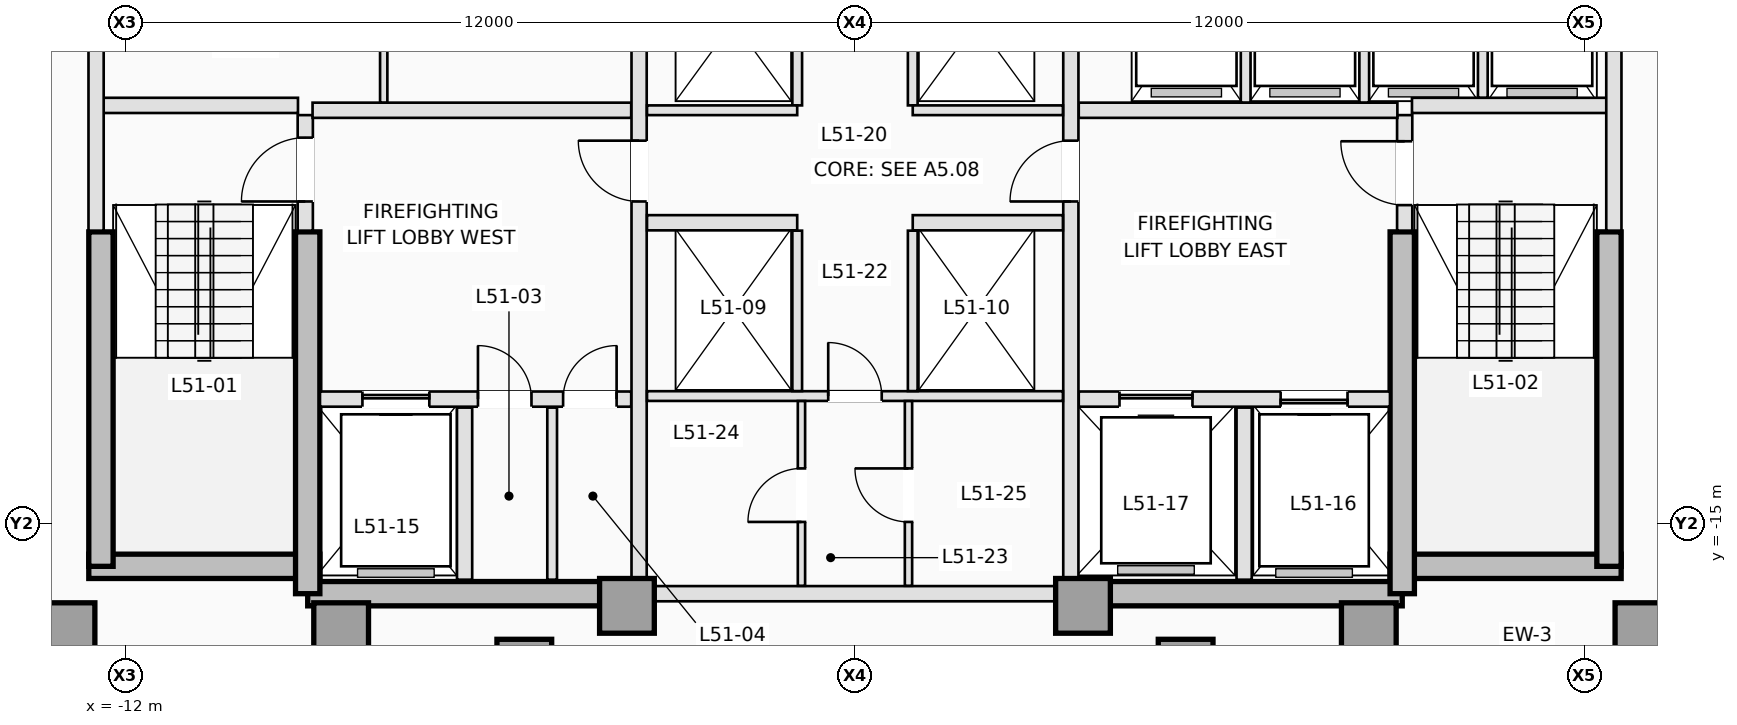
"""IFC4 building model, lengths in metres.
Left out: names, types, materials, properties, quantities, classifications, styles, units other than length and angle.
Written with IfcOpenShell. Run it as: python <this file> out.ifc"""

import sys

from ifc_helpers import new_model, si_unit, direction, frame, frame_2d, origin, origin_2d, place, context, subcontext, project, spatial, rectangle, extrude, element, fill, save


model = new_model("IFC4")
c1 = context("Model", 3, precision=1e-05, world=origin(), true_north=direction((0.0, 1.0)))
c2 = subcontext(c1, "Body", "Model", "MODEL_VIEW")
j1 = project(units=[si_unit("LENGTHUNIT", "METRE"), si_unit("PLANEANGLEUNIT", "RADIAN")], contexts=[c1])
p1 = place(None, origin())
s1 = spatial("IfcSite", under=j1, at=p1, CompositionType="ELEMENT")
p2 = place(p1, origin())
s2 = spatial("IfcBuilding", under=s1, at=p2, CompositionType="ELEMENT")
p3 = place(p2, frame((0.0, 0.0, 186.9)))
s3 = spatial("IfcBuildingStorey", under=s2, at=p3, CompositionType="ELEMENT", Elevation=186.9)
p4 = place(p3, frame((-12.6, -15.7, 0.0), z_axis=(0.0, 0.0, 1.0), x_axis=(1.0, 0.0, 0.0)))
e1 = element("IfcWall", 1, at=p4, inside=s3, PredefinedType="SHEAR", context=c2, shape_type="SweptSolid", body=[
    extrude(rectangle(XDim=3.8, YDim=0.4, at=frame_2d((1.9, 0.0))), origin(), (0.0, 0.0, 1.0), 3.5),
])
for number, where, z_axis, x_axis in (
    (2, (-9.0, -16.15, 0.0), (0.0, 0.0, 1.0), (1.0, 0.0, 0.0)),
    (3, (3.75, -16.15, 0.0), (0.0, 0.0, 1.0), (1.0, 0.0, 0.0)),
):
    element("IfcWall", number, at=place(p3, frame(where, z_axis=z_axis, x_axis=x_axis)), inside=s3, PredefinedType="SHEAR", context=c2, shape_type="SweptSolid", body=[
        extrude(rectangle(XDim=5.25, YDim=0.4, at=frame_2d((2.625, 0.0))), origin(), (0.0, 0.0, 1.0), 3.5),
    ])
p5 = place(p3, frame((8.8, -15.7, 0.0), z_axis=(0.0, 0.0, 1.0), x_axis=(1.0, 0.0, 0.0)))
e4 = element("IfcWall", 4, at=p5, inside=s3, PredefinedType="SHEAR", context=c2, shape_type="SweptSolid", body=[
    extrude(rectangle(XDim=3.8, YDim=0.4, at=frame_2d((1.9, 0.0))), origin(), (0.0, 0.0, 1.0), 3.5),
])
for number, where, z_axis, x_axis in (
    (5, (-12.4, -15.7, 0.0), (0.0, 0.0, 1.0), (0.0, 1.0, 0.0)),
    (6, (12.4, -15.7, 0.0), (0.0, 0.0, 1.0), (0.0, 1.0, 0.0)),
):
    element("IfcWall", number, at=place(p3, frame(where, z_axis=z_axis, x_axis=x_axis)), inside=s3, PredefinedType="SHEAR", context=c2, shape_type="SweptSolid", body=[
        extrude(rectangle(XDim=5.5, YDim=0.4, at=frame_2d((2.75, 0.0))), origin(), (0.0, 0.0, 1.0), 3.5),
    ])
for number, where, z_axis, x_axis in (
    (7, (-9.0, -16.15, 0.0), (0.0, 0.0, 1.0), (0.0, 1.0, 0.0)),
    (8, (9.0, -16.15, 0.0), (0.0, 0.0, 1.0), (0.0, 1.0, 0.0)),
):
    element("IfcWall", number, at=place(p3, frame(where, z_axis=z_axis, x_axis=x_axis)), inside=s3, PredefinedType="SHEAR", context=c2, shape_type="SweptSolid", body=[
        extrude(rectangle(XDim=5.95, YDim=0.4, at=frame_2d((2.975, 0.0))), origin(), (0.0, 0.0, 1.0), 3.5),
    ])
for number, where, z_axis, x_axis in (
    (9, (-12.95, -16.75, 0.0), (0.0, 0.0, 1.0), (1.0, 0.0, 0.0)),
    (10, (-8.45, -16.75, 0.0), (0.0, 0.0, 1.0), (1.0, 0.0, 0.0)),
    (11, (-3.75, -16.35, 0.0), (0.0, 0.0, 1.0), (1.0, 0.0, 0.0)),
    (12, (3.75, -16.35, 0.0), (0.0, 0.0, 1.0), (1.0, 0.0, 0.0)),
    (13, (8.45, -16.75, 0.0), (0.0, 0.0, 1.0), (1.0, 0.0, 0.0)),
    (14, (12.95, -16.75, 0.0), (0.0, 0.0, 1.0), (1.0, 0.0, 0.0)),
    (15, (-5.438, -17.35, 0.0), (0.0, 0.0, 1.0), (0.0, 1.0, 0.0)),
    (16, (5.438, -17.35, 0.0), (0.0, 0.0, 1.0), (0.0, 1.0, 0.0)),
):
    element("IfcColumn", number, at=place(p3, frame(where, z_axis=z_axis, x_axis=x_axis)), inside=s3, PredefinedType="COLUMN", context=c2, shape_type="SweptSolid", body=[
        extrude(rectangle(XDim=0.9, YDim=0.9, at=origin_2d()), origin(), (0.0, 0.0, 1.0), 3.5),
    ])
p6 = place(p3, frame((-9.04, -10.18, 0.0), z_axis=(0.0, 0.0, 1.0), x_axis=(0.0, 1.0, 0.0)))
e17 = element("IfcWall", 17, at=p6, inside=s3, PredefinedType="PARTITIONING", context=c2, shape_type="SweptSolid", body=[
    extrude(rectangle(XDim=1.9, YDim=0.25, at=frame_2d((0.95, 0.0))), origin(), (0.0, 0.0, 1.0), 3.25),
])
p7 = place(p6, frame((0.48, 0.0, 0.0)))
e18 = element("IfcOpeningElement", 18, at=p7, cuts=e17, PredefinedType="OPENING", context=c2, shape_type="SweptSolid", body=[
    extrude(rectangle(XDim=1.05, YDim=2.15, at=frame_2d((0.525, 1.075))), frame((0.0, 0.135, 0.0), z_axis=(0.0, -1.0, 0.0), x_axis=(1.0, 0.0, 0.0)), (0.0, 0.0, 1.0), 0.27),
])
p8 = place(p3, frame((9.04, -10.18, 0.0), z_axis=(0.0, 0.0, 1.0), x_axis=(0.0, 1.0, 0.0)))
e19 = element("IfcWall", 19, at=p8, inside=s3, PredefinedType="PARTITIONING", context=c2, shape_type="SweptSolid", body=[
    extrude(rectangle(XDim=1.9, YDim=0.25, at=frame_2d((0.95, 0.0))), origin(), (0.0, 0.0, 1.0), 3.25),
])
p9 = place(p8, frame((0.42, 0.0, 0.0)))
e20 = element("IfcOpeningElement", 20, at=p9, cuts=e19, PredefinedType="OPENING", context=c2, shape_type="SweptSolid", body=[
    extrude(rectangle(XDim=1.05, YDim=2.15, at=frame_2d((0.525, 1.075))), frame((0.0, 0.135, 0.0), z_axis=(0.0, -1.0, 0.0), x_axis=(1.0, 0.0, 0.0)), (0.0, 0.0, 1.0), 0.27),
])
for number, where, z_axis, x_axis in (
    (21, (-12.38, -8.12, 0.0), (0.0, 0.0, 1.0), (1.0, 0.0, 0.0)),
    (22, (9.16, -8.12, 0.0), (0.0, 0.0, 1.0), (1.0, 0.0, 0.0)),
):
    element("IfcWall", number, at=place(p3, frame(where, z_axis=z_axis, x_axis=x_axis)), inside=s3, PredefinedType="PARTITIONING", context=c2, shape_type="SweptSolid", body=[
        extrude(rectangle(XDim=3.22, YDim=0.25, at=frame_2d((1.61, 0.0))), origin(), (0.0, 0.0, 1.0), 3.25),
    ])
for number, where, z_axis, x_axis in (
    (23, (-12.48, -10.18, 0.0), (0.0, 0.0, 1.0), (0.0, 1.0, 0.0)),
    (24, (12.48, -10.18, 0.0), (0.0, 0.0, 1.0), (0.0, 1.0, 0.0)),
):
    element("IfcWall", number, at=place(p3, frame(where, z_axis=z_axis, x_axis=x_axis)), inside=s3, PredefinedType="PARTITIONING", context=c2, shape_type="SweptSolid", body=[
        extrude(rectangle(XDim=4.84, YDim=0.25, at=frame_2d((2.42, 0.0))), origin(), (0.0, 0.0, 1.0), 3.25),
    ])
p10 = place(p3, frame((-8.798, -12.95, 0.0), z_axis=(0.0, 0.0, 1.0), x_axis=(1.0, 0.0, 0.0)))
e25 = element("IfcWall", 25, at=p10, inside=s3, PredefinedType="PARTITIONING", context=c2, shape_type="SweptSolid", body=[
    extrude(rectangle(XDim=5.118, YDim=0.25, at=frame_2d((2.559, 0.0))), origin(), (0.0, 0.0, 1.0), 3.25),
])
p11 = place(p10, frame((0.698, 0.0, 0.0)))
e26 = element("IfcOpeningElement", 26, at=p11, cuts=e25, PredefinedType="OPENING", context=c2, shape_type="SweptSolid", body=[
    extrude(rectangle(XDim=1.1, YDim=2.15, at=frame_2d((0.55, 1.075))), frame((0.0, 0.135, 0.0), z_axis=(0.0, -1.0, 0.0), x_axis=(1.0, 0.0, 0.0)), (0.0, 0.0, 1.0), 0.27),
])
p12 = place(p10, frame((2.598, 0.0, 0.0)))
e27 = element("IfcOpeningElement", 27, at=p12, cuts=e25, PredefinedType="OPENING", context=c2, shape_type="SweptSolid", body=[
    extrude(rectangle(XDim=0.88, YDim=2.1, at=frame_2d((0.44, 1.05))), frame((0.0, 0.135, 0.0), z_axis=(0.0, -1.0, 0.0), x_axis=(1.0, 0.0, 0.0)), (0.0, 0.0, 1.0), 0.27),
])
p13 = place(p10, frame((3.998, 0.0, 0.0)))
e28 = element("IfcOpeningElement", 28, at=p13, cuts=e25, PredefinedType="OPENING", context=c2, shape_type="SweptSolid", body=[
    extrude(rectangle(XDim=0.88, YDim=2.1, at=frame_2d((0.44, 1.05))), frame((0.0, 0.135, 0.0), z_axis=(0.0, -1.0, 0.0), x_axis=(1.0, 0.0, 0.0)), (0.0, 0.0, 1.0), 0.27),
])
p14 = place(p3, frame((3.68, -12.95, 0.0), z_axis=(0.0, 0.0, 1.0), x_axis=(1.0, 0.0, 0.0)))
e29 = element("IfcWall", 29, at=p14, inside=s3, PredefinedType="PARTITIONING", context=c2, shape_type="SweptSolid", body=[
    extrude(rectangle(XDim=5.118, YDim=0.25, at=frame_2d((2.559, 0.0))), origin(), (0.0, 0.0, 1.0), 3.25),
])
p15 = place(p14, frame((3.32, 0.0, 0.0)))
e30 = element("IfcOpeningElement", 30, at=p15, cuts=e29, PredefinedType="OPENING", context=c2, shape_type="SweptSolid", body=[
    extrude(rectangle(XDim=1.1, YDim=2.15, at=frame_2d((0.55, 1.075))), frame((0.0, 0.135, 0.0), z_axis=(0.0, -1.0, 0.0), x_axis=(1.0, 0.0, 0.0)), (0.0, 0.0, 1.0), 0.27),
])
p16 = place(p14, frame((0.67, 0.0, 0.0)))
e31 = element("IfcOpeningElement", 31, at=p16, cuts=e29, PredefinedType="OPENING", context=c2, shape_type="SweptSolid", body=[
    extrude(rectangle(XDim=1.2, YDim=2.15, at=frame_2d((0.6, 1.075))), frame((0.0, 0.135, 0.0), z_axis=(0.0, -1.0, 0.0), x_axis=(1.0, 0.0, 0.0)), (0.0, 0.0, 1.0), 0.27),
])
p17 = place(p3, frame((-6.42, -15.92, 0.0), z_axis=(0.0, 0.0, 1.0), x_axis=(0.0, 1.0, 0.0)))
e32 = element("IfcWall", 32, at=p17, inside=s3, PredefinedType="PARTITIONING", context=c2, shape_type="SweptSolid", body=[
    extrude(rectangle(XDim=2.83, YDim=0.25, at=frame_2d((1.415, 0.0))), origin(), (0.0, 0.0, 1.0), 3.25),
])
p18 = place(p3, frame((-4.98, -15.92, 0.0), z_axis=(0.0, 0.0, 1.0), x_axis=(0.0, 1.0, 0.0)))
e33 = element("IfcWall", 33, at=p18, inside=s3, PredefinedType="PARTITIONING", context=c2, shape_type="SweptSolid", body=[
    extrude(rectangle(XDim=2.83, YDim=0.16, at=frame_2d((1.415, 0.0))), origin(), (0.0, 0.0, 1.0), 3.25),
])
p19 = place(p3, frame((6.4, -15.92, 0.0), z_axis=(0.0, 0.0, 1.0), x_axis=(0.0, 1.0, 0.0)))
e34 = element("IfcWall", 34, at=p19, inside=s3, PredefinedType="PARTITIONING", context=c2, shape_type="SweptSolid", body=[
    extrude(rectangle(XDim=2.83, YDim=0.25, at=frame_2d((1.415, 0.0))), origin(), (0.0, 0.0, 1.0), 3.25),
])
for number, where, z_axis, x_axis in (
    (35, (-8.92, -8.2, 0.0), (0.0, 0.0, 1.0), (1.0, 0.0, 0.0)),
    (36, (3.68, -8.2, 0.0), (0.0, 0.0, 1.0), (1.0, 0.0, 0.0)),
):
    element("IfcWall", number, at=place(p3, frame(where, z_axis=z_axis, x_axis=x_axis)), inside=s3, PredefinedType="PARTITIONING", context=c2, shape_type="SweptSolid", body=[
        extrude(rectangle(XDim=5.24, YDim=0.25, at=frame_2d((2.62, 0.0))), origin(), (0.0, 0.0, 1.0), 3.25),
    ])
p20 = place(p3, frame((-3.55, -15.898, 0.0), z_axis=(0.0, 0.0, 1.0), x_axis=(0.0, 1.0, 0.0)))
e37 = element("IfcWall", 37, at=p20, inside=s3, PredefinedType="PARTITIONING", context=c2, shape_type="SweptSolid", body=[
    extrude(rectangle(XDim=10.558, YDim=0.25, at=frame_2d((5.279, 0.0))), origin(), (0.0, 0.0, 1.0), 3.25),
])
p21 = place(p20, frame((6.198, 0.0, 0.0)))
e38 = element("IfcOpeningElement", 38, at=p21, cuts=e37, PredefinedType="OPENING", context=c2, shape_type="SweptSolid", body=[
    extrude(rectangle(XDim=1.0, YDim=2.15, at=frame_2d((0.5, 1.075))), frame((0.0, 0.135, 0.0), z_axis=(0.0, -1.0, 0.0), x_axis=(1.0, 0.0, 0.0)), (0.0, 0.0, 1.0), 0.27),
])
p22 = place(p3, frame((3.55, -15.898, 0.0), z_axis=(0.0, 0.0, 1.0), x_axis=(0.0, 1.0, 0.0)))
e39 = element("IfcWall", 39, at=p22, inside=s3, PredefinedType="PARTITIONING", context=c2, shape_type="SweptSolid", body=[
    extrude(rectangle(XDim=10.558, YDim=0.25, at=frame_2d((5.279, 0.0))), origin(), (0.0, 0.0, 1.0), 3.25),
])
p23 = place(p22, frame((6.198, 0.0, 0.0)))
e40 = element("IfcOpeningElement", 40, at=p23, cuts=e39, PredefinedType="OPENING", context=c2, shape_type="SweptSolid", body=[
    extrude(rectangle(XDim=1.0, YDim=2.15, at=frame_2d((0.5, 1.075))), frame((0.0, 0.135, 0.0), z_axis=(0.0, -1.0, 0.0), x_axis=(1.0, 0.0, 0.0)), (0.0, 0.0, 1.0), 0.27),
])
p24 = place(p3, frame((-7.75, -8.073, 0.0), z_axis=(0.0, 0.0, 1.0), x_axis=(0.0, 1.0, 0.0)))
e41 = element("IfcWall", 41, at=p24, inside=s3, PredefinedType="PARTITIONING", context=c2, shape_type="SweptSolid", body=[
    extrude(rectangle(XDim=2.733, YDim=0.12, at=frame_2d((1.366, 0.0))), origin(), (0.0, 0.0, 1.0), 3.25),
])
for number, where, z_axis, x_axis in (
    (42, (6.425, -8.073, 0.0), (0.0, 0.0, 1.0), (0.0, 1.0, 0.0)),
    (43, (8.375, -8.073, 0.0), (0.0, 0.0, 1.0), (0.0, 1.0, 0.0)),
):
    element("IfcWall", number, at=place(p3, frame(where, z_axis=z_axis, x_axis=x_axis)), inside=s3, PredefinedType="PARTITIONING", context=c2, shape_type="SweptSolid", body=[
        extrude(rectangle(XDim=2.733, YDim=0.16, at=frame_2d((1.366, 0.0))), origin(), (0.0, 0.0, 1.0), 3.25),
    ])
p25 = place(p3, frame((10.325, -7.993, 0.0), z_axis=(0.0, 0.0, 1.0), x_axis=(0.0, 1.0, 0.0)))
e44 = element("IfcWall", 44, at=p25, inside=s3, PredefinedType="PARTITIONING", context=c2, shape_type="SweptSolid", body=[
    extrude(rectangle(XDim=2.653, YDim=0.16, at=frame_2d((1.326, 0.0))), origin(), (0.0, 0.0, 1.0), 3.25),
])
p26 = place(p3, frame((-3.298, -16.15, 0.0), z_axis=(0.0, 0.0, 1.0), x_axis=(1.0, 0.0, 0.0)))
e45 = element("IfcWall", 45, at=p26, inside=s3, PredefinedType="PARTITIONING", context=c2, shape_type="SweptSolid", body=[
    extrude(rectangle(XDim=6.596, YDim=0.25, at=frame_2d((3.298, 0.0))), origin(), (0.0, 0.0, 1.0), 2.45),
])
for number, where, z_axis, x_axis in (
    (46, (-0.95, -8.12, 0.0), (0.0, 0.0, 1.0), (0.0, 1.0, 0.0)),
    (47, (0.95, -8.12, 0.0), (0.0, 0.0, 1.0), (0.0, 1.0, 0.0)),
):
    element("IfcWall", number, at=place(p3, frame(where, z_axis=z_axis, x_axis=x_axis)), inside=s3, PredefinedType="PARTITIONING", context=c2, shape_type="SweptSolid", body=[
        extrude(rectangle(XDim=2.78, YDim=0.16, at=frame_2d((1.39, 0.0))), origin(), (0.0, 0.0, 1.0), 3.25),
    ])
for number, where, z_axis, x_axis in (
    (48, (-3.42, -8.2, 0.0), (0.0, 0.0, 1.0), (1.0, 0.0, 0.0)),
    (49, (0.95, -8.2, 0.0), (0.0, 0.0, 1.0), (1.0, 0.0, 0.0)),
):
    element("IfcWall", number, at=place(p3, frame(where, z_axis=z_axis, x_axis=x_axis)), inside=s3, PredefinedType="PARTITIONING", context=c2, shape_type="SweptSolid", body=[
        extrude(rectangle(XDim=2.47, YDim=0.16, at=frame_2d((1.235, 0.0))), origin(), (0.0, 0.0, 1.0), 3.25),
    ])
for number, where, z_axis, x_axis in (
    (50, (-3.42, -10.05, 0.0), (0.0, 0.0, 1.0), (1.0, 0.0, 0.0)),
    (51, (0.95, -10.05, 0.0), (0.0, 0.0, 1.0), (1.0, 0.0, 0.0)),
):
    element("IfcWall", number, at=place(p3, frame(where, z_axis=z_axis, x_axis=x_axis)), inside=s3, PredefinedType="PARTITIONING", context=c2, shape_type="SweptSolid", body=[
        extrude(rectangle(XDim=2.47, YDim=0.25, at=frame_2d((1.235, 0.0))), origin(), (0.0, 0.0, 1.0), 3.25),
    ])
p27 = place(p3, frame((-3.42, -12.9, 0.0), z_axis=(0.0, 0.0, 1.0), x_axis=(1.0, 0.0, 0.0)))
e52 = element("IfcWall", 52, at=p27, inside=s3, PredefinedType="PARTITIONING", context=c2, shape_type="SweptSolid", body=[
    extrude(rectangle(XDim=6.84, YDim=0.16, at=frame_2d((3.42, 0.0))), origin(), (0.0, 0.0, 1.0), 3.25),
])
p28 = place(p27, frame((2.98, 0.0, 0.0)))
e53 = element("IfcOpeningElement", 53, at=p28, cuts=e52, PredefinedType="OPENING", context=c2, shape_type="SweptSolid", body=[
    extrude(rectangle(XDim=0.88, YDim=2.12, at=frame_2d((0.44, 1.06))), frame((0.0, 0.09, 0.0), z_axis=(0.0, -1.0, 0.0), x_axis=(1.0, 0.0, 0.0)), (0.0, 0.0, 1.0), 0.18),
])
for number, where, z_axis, x_axis in (
    (54, (-0.95, -12.818, 0.0), (0.0, 0.0, 1.0), (0.0, 1.0, 0.0)),
    (55, (0.95, -12.818, 0.0), (0.0, 0.0, 1.0), (0.0, 1.0, 0.0)),
):
    element("IfcWall", number, at=place(p3, frame(where, z_axis=z_axis, x_axis=x_axis)), inside=s3, PredefinedType="PARTITIONING", context=c2, shape_type="SweptSolid", body=[
        extrude(rectangle(XDim=2.638, YDim=0.16, at=frame_2d((1.319, 0.0))), origin(), (0.0, 0.0, 1.0), 3.25),
    ])
p29 = place(p3, frame((-0.88, -16.02, 0.0), z_axis=(0.0, 0.0, 1.0), x_axis=(0.0, 1.0, 0.0)))
e56 = element("IfcWall", 56, at=p29, inside=s3, PredefinedType="PARTITIONING", context=c2, shape_type="SweptSolid", body=[
    extrude(rectangle(XDim=3.038, YDim=0.12, at=frame_2d((1.519, 0.0))), origin(), (0.0, 0.0, 1.0), 3.25),
])
p30 = place(p29, frame((1.05, 0.0, 0.0)))
e57 = element("IfcOpeningElement", 57, at=p30, cuts=e56, PredefinedType="OPENING", context=c2, shape_type="SweptSolid", body=[
    extrude(rectangle(XDim=0.88, YDim=2.12, at=frame_2d((0.44, 1.06))), frame((0.0, 0.07, 0.0), z_axis=(0.0, -1.0, 0.0), x_axis=(1.0, 0.0, 0.0)), (0.0, 0.0, 1.0), 0.14),
])
p31 = place(p3, frame((0.88, -16.02, 0.0), z_axis=(0.0, 0.0, 1.0), x_axis=(0.0, 1.0, 0.0)))
e58 = element("IfcWall", 58, at=p31, inside=s3, PredefinedType="PARTITIONING", context=c2, shape_type="SweptSolid", body=[
    extrude(rectangle(XDim=3.038, YDim=0.12, at=frame_2d((1.519, 0.0))), origin(), (0.0, 0.0, 1.0), 3.25),
])
p32 = place(p31, frame((1.05, 0.0, 0.0)))
e59 = element("IfcOpeningElement", 59, at=p32, cuts=e58, PredefinedType="OPENING", context=c2, shape_type="SweptSolid", body=[
    extrude(rectangle(XDim=0.88, YDim=2.12, at=frame_2d((0.44, 1.06))), frame((0.0, 0.07, 0.0), z_axis=(0.0, -1.0, 0.0), x_axis=(1.0, 0.0, 0.0)), (0.0, 0.0, 1.0), 0.14),
])
p33 = place(p11, origin())
e60 = element("IfcDoor", 60, at=p33, inside=s3, OperationType="SLIDING_TO_LEFT", PredefinedType="DOOR", context=c2, shape_type="SweptSolid", body=[
    extrude(rectangle(XDim=1.1, YDim=2.15, at=frame_2d((0.55, 1.075))), frame((0.0, 0.025, 0.0), z_axis=(0.0, -1.0, 0.0), x_axis=(1.0, 0.0, 0.0)), (0.0, 0.0, 1.0), 0.05),
])
fill(e26, e60)
p34 = place(p15, origin())
e61 = element("IfcDoor", 61, at=p34, inside=s3, OperationType="SLIDING_TO_RIGHT", PredefinedType="DOOR", context=c2, shape_type="SweptSolid", body=[
    extrude(rectangle(XDim=1.1, YDim=2.15, at=frame_2d((0.55, 1.075))), frame((0.0, 0.025, 0.0), z_axis=(0.0, -1.0, 0.0), x_axis=(1.0, 0.0, 0.0)), (0.0, 0.0, 1.0), 0.05),
])
fill(e30, e61)
p35 = place(p16, origin())
e62 = element("IfcDoor", 62, at=p35, inside=s3, OperationType="SLIDING_TO_LEFT", PredefinedType="DOOR", context=c2, shape_type="SweptSolid", body=[
    extrude(rectangle(XDim=1.2, YDim=2.15, at=frame_2d((0.6, 1.075))), frame((0.0, 0.025, 0.0), z_axis=(0.0, -1.0, 0.0), x_axis=(1.0, 0.0, 0.0)), (0.0, 0.0, 1.0), 0.05),
])
fill(e31, e62)
p36 = place(p7, origin())
e63 = element("IfcDoor", 63, at=p36, inside=s3, OperationType="SINGLE_SWING_LEFT", PredefinedType="DOOR", context=c2, shape_type="SweptSolid", body=[
    extrude(rectangle(XDim=1.05, YDim=2.15, at=frame_2d((0.525, 1.075))), frame((0.0, 0.025, 0.0), z_axis=(0.0, -1.0, 0.0), x_axis=(1.0, 0.0, 0.0)), (0.0, 0.0, 1.0), 0.05),
])
fill(e18, e63)
p37 = place(p9, origin())
e64 = element("IfcDoor", 64, at=p37, inside=s3, OperationType="SINGLE_SWING_RIGHT", PredefinedType="DOOR", context=c2, shape_type="SweptSolid", body=[
    extrude(rectangle(XDim=1.05, YDim=2.15, at=frame_2d((0.525, 1.075))), frame((0.0, 0.025, 0.0), z_axis=(0.0, -1.0, 0.0), x_axis=(1.0, 0.0, 0.0)), (0.0, 0.0, 1.0), 0.05),
])
fill(e20, e64)
p38 = place(p12, origin())
e65 = element("IfcDoor", 65, at=p38, inside=s3, OperationType="SINGLE_SWING_LEFT", PredefinedType="TRAPDOOR", context=c2, shape_type="SweptSolid", body=[
    extrude(rectangle(XDim=0.88, YDim=2.1, at=frame_2d((0.44, 1.05))), frame((0.0, 0.025, 0.0), z_axis=(0.0, -1.0, 0.0), x_axis=(1.0, 0.0, 0.0)), (0.0, 0.0, 1.0), 0.05),
])
fill(e27, e65)
p39 = place(p13, origin())
e66 = element("IfcDoor", 66, at=p39, inside=s3, OperationType="SINGLE_SWING_RIGHT", PredefinedType="TRAPDOOR", context=c2, shape_type="SweptSolid", body=[
    extrude(rectangle(XDim=0.88, YDim=2.1, at=frame_2d((0.44, 1.05))), frame((0.0, 0.025, 0.0), z_axis=(0.0, -1.0, 0.0), x_axis=(1.0, 0.0, 0.0)), (0.0, 0.0, 1.0), 0.05),
])
fill(e28, e66)
p40 = place(p21, origin())
e67 = element("IfcDoor", 67, at=p40, inside=s3, OperationType="SINGLE_SWING_RIGHT", PredefinedType="DOOR", context=c2, shape_type="SweptSolid", body=[
    extrude(rectangle(XDim=1.0, YDim=2.15, at=frame_2d((0.5, 1.075))), frame((0.0, 0.025, 0.0), z_axis=(0.0, -1.0, 0.0), x_axis=(1.0, 0.0, 0.0)), (0.0, 0.0, 1.0), 0.05),
])
fill(e38, e67)
p41 = place(p23, origin())
e68 = element("IfcDoor", 68, at=p41, inside=s3, OperationType="SINGLE_SWING_LEFT", PredefinedType="DOOR", context=c2, shape_type="SweptSolid", body=[
    extrude(rectangle(XDim=1.0, YDim=2.15, at=frame_2d((0.5, 1.075))), frame((0.0, 0.025, 0.0), z_axis=(0.0, -1.0, 0.0), x_axis=(1.0, 0.0, 0.0)), (0.0, 0.0, 1.0), 0.05),
])
fill(e40, e68)
p42 = place(p28, origin())
e69 = element("IfcDoor", 69, at=p42, inside=s3, OperationType="SINGLE_SWING_LEFT", PredefinedType="DOOR", context=c2, shape_type="SweptSolid", body=[
    extrude(rectangle(XDim=0.88, YDim=2.12, at=frame_2d((0.44, 1.06))), frame((0.0, 0.025, 0.0), z_axis=(0.0, -1.0, 0.0), x_axis=(1.0, 0.0, 0.0)), (0.0, 0.0, 1.0), 0.05),
])
fill(e53, e69)
p43 = place(p30, origin())
e70 = element("IfcDoor", 70, at=p43, inside=s3, OperationType="SINGLE_SWING_LEFT", PredefinedType="DOOR", context=c2, shape_type="SweptSolid", body=[
    extrude(rectangle(XDim=0.88, YDim=2.12, at=frame_2d((0.44, 1.06))), frame((0.0, 0.025, 0.0), z_axis=(0.0, -1.0, 0.0), x_axis=(1.0, 0.0, 0.0)), (0.0, 0.0, 1.0), 0.05),
])
fill(e57, e70)
p44 = place(p32, origin())
e71 = element("IfcDoor", 71, at=p44, inside=s3, OperationType="SINGLE_SWING_RIGHT", PredefinedType="DOOR", context=c2, shape_type="SweptSolid", body=[
    extrude(rectangle(XDim=0.88, YDim=2.12, at=frame_2d((0.44, 1.06))), frame((0.0, 0.025, 0.0), z_axis=(0.0, -1.0, 0.0), x_axis=(1.0, 0.0, 0.0)), (0.0, 0.0, 1.0), 0.05),
])
fill(e59, e71)
save(model, sys.argv[1])
